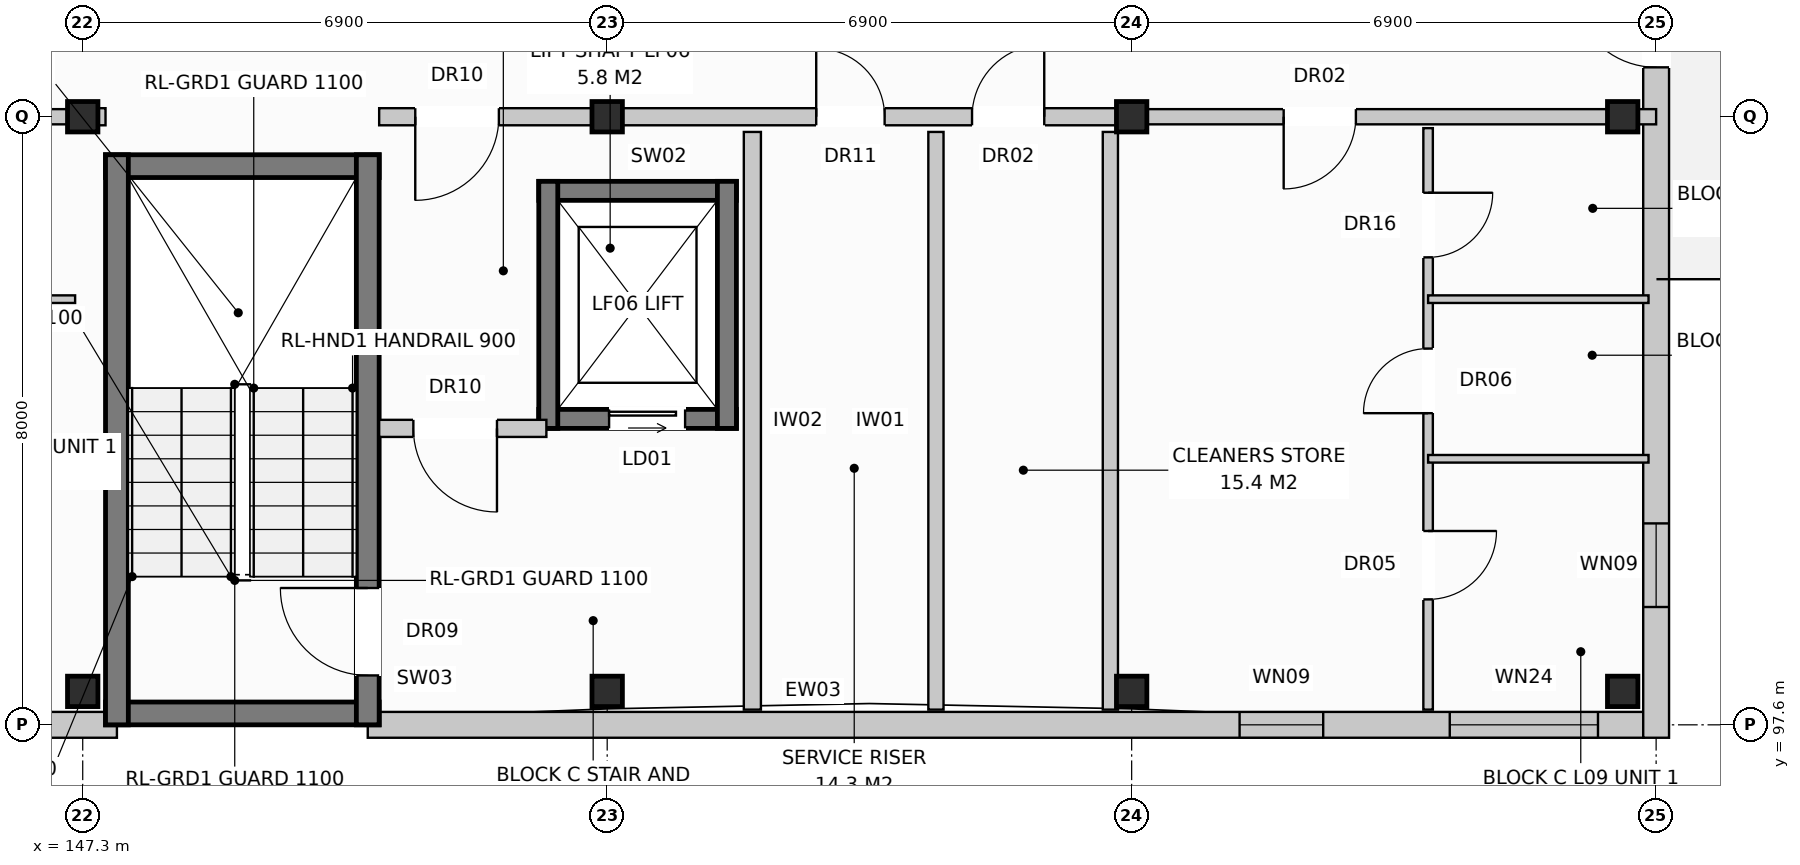
"""IFC4 building model, lengths in metres.
Left out: names, types, materials, properties, quantities, classifications, styles, units other than length and angle.
Written with IfcOpenShell. Run it as: python <this file> out.ifc"""

import sys

from ifc_helpers import new_model, si_unit, direction, frame, frame_2d, origin, origin_with_axes, origin_2d, place, context, subcontext, project, spatial, rectangle, extrude, element, fill, save


model = new_model("IFC4")
c1 = context("Model", 3, precision=1e-05, world=origin(), true_north=direction((0.0, 1.0)))
c2 = subcontext(c1, "Body", "Model", "MODEL_VIEW")
j1 = project(units=[si_unit("LENGTHUNIT", "METRE"), si_unit("PLANEANGLEUNIT", "RADIAN")], contexts=[c1])
p1 = place(None, origin())
s1 = spatial("IfcSite", under=j1, at=p1, CompositionType="ELEMENT")
p2 = place(p1, origin())
s2 = spatial("IfcBuilding", under=s1, at=p2, CompositionType="ELEMENT")
p3 = place(p2, frame((0.0, 0.0, 30.4)))
s3 = spatial("IfcBuildingStorey", under=s2, at=p3, CompositionType="ELEMENT", Elevation=30.4)
for number, where, z_axis, x_axis in (
    (1, (147.3, 98.04, 0.0), (0.0, 0.0, 1.0), (1.0, 0.0, 0.0)),
    (2, (147.3, 105.6, 0.0), (0.0, 0.0, 1.0), (1.0, 0.0, 0.0)),
    (3, (154.2, 98.04, 0.0), (0.0, 0.0, 1.0), (1.0, 0.0, 0.0)),
    (4, (154.2, 105.6, 0.0), (0.0, 0.0, 1.0), (1.0, 0.0, 0.0)),
    (5, (161.1, 98.04, 0.0), (0.0, 0.0, 1.0), (1.0, 0.0, 0.0)),
    (6, (161.1, 105.6, 0.0), (0.0, 0.0, 1.0), (1.0, 0.0, 0.0)),
    (7, (167.56, 98.04, 0.0), (0.0, 0.0, 1.0), (1.0, 0.0, 0.0)),
    (8, (167.56, 105.6, 0.0), (0.0, 0.0, 1.0), (1.0, 0.0, 0.0)),
):
    element("IfcColumn", number, at=place(p3, frame(where, z_axis=z_axis, x_axis=x_axis)), inside=s3, PredefinedType="COLUMN", context=c2, shape_type="SweptSolid", body=[
        extrude(rectangle(XDim=0.4, YDim=0.4, at=origin_2d()), origin(), (0.0, 0.0, 1.0), 3.2),
    ])
p4 = place(p3, frame((130.35, 97.6, 0.0), z_axis=(0.0, 0.0, 1.0), x_axis=(1.0, 0.0, 0.0)))
e9 = element("IfcWall", 9, at=p4, inside=s3, PredefinedType="STANDARD", context=c2, shape_type="SweptSolid", body=[
    extrude(rectangle(XDim=17.4, YDim=0.34, at=frame_2d((8.7, 0.0))), origin(), (0.0, 0.0, 1.0), 2.96),
])
p5 = place(p4, frame((11.879, 0.0, 0.0)))
e10 = element("IfcOpeningElement", 10, at=p5, cuts=e9, PredefinedType="OPENING", context=c2, shape_type="SweptSolid", body=[
    extrude(rectangle(XDim=0.95, YDim=2.1, at=frame_2d((0.475, 1.05))), frame((0.0, 0.182, 0.0), z_axis=(0.0, -1.0, 0.0), x_axis=(1.0, 0.0, 0.0)), (0.0, 0.0, 1.0), 0.364),
])
p6 = place(p4, frame((14.87, 0.0, 0.72)))
e11 = element("IfcOpeningElement", 11, at=p6, cuts=e9, PredefinedType="OPENING", context=c2, shape_type="SweptSolid", body=[
    extrude(rectangle(XDim=1.1, YDim=1.5, at=frame_2d((0.55, 0.75))), frame((0.0, 0.182, 0.0), z_axis=(0.0, -1.0, 0.0), x_axis=(1.0, 0.0, 0.0)), (0.0, 0.0, 1.0), 0.364),
])
p7 = place(p3, frame((151.05, 97.6, 0.0), z_axis=(0.0, 0.0, 1.0), x_axis=(1.0, 0.0, 0.0)))
e12 = element("IfcWall", 12, at=p7, inside=s3, PredefinedType="STANDARD", context=c2, shape_type="SweptSolid", body=[
    extrude(rectangle(XDim=16.79, YDim=0.34, at=frame_2d((8.395, 0.0))), origin(), (0.0, 0.0, 1.0), 2.96),
])
p8 = place(p7, frame((11.47, 0.0, 0.72)))
e13 = element("IfcOpeningElement", 13, at=p8, cuts=e12, PredefinedType="OPENING", context=c2, shape_type="SweptSolid", body=[
    extrude(rectangle(XDim=1.1, YDim=1.5, at=frame_2d((0.55, 0.75))), frame((0.0, 0.182, 0.0), z_axis=(0.0, -1.0, 0.0), x_axis=(1.0, 0.0, 0.0)), (0.0, 0.0, 1.0), 0.364),
])
p9 = place(p7, frame((14.235, 0.0, 0.8)))
e14 = element("IfcOpeningElement", 14, at=p9, cuts=e12, PredefinedType="OPENING", context=c2, shape_type="SweptSolid", body=[
    extrude(rectangle(XDim=1.95, YDim=1.65, at=frame_2d((0.975, 0.825))), frame((0.0, 0.182, 0.0), z_axis=(0.0, -1.0, 0.0), x_axis=(1.0, 0.0, 0.0)), (0.0, 0.0, 1.0), 0.364),
])
p10 = place(p3, frame((168.0, 97.43, 0.0), z_axis=(0.0, 0.0, 1.0), x_axis=(0.0, 1.0, 0.0)))
e15 = element("IfcWall", 15, at=p10, inside=s3, PredefinedType="STANDARD", context=c2, shape_type="SweptSolid", body=[
    extrude(rectangle(XDim=18.74, YDim=0.34, at=frame_2d((9.37, 0.0))), origin(), (0.0, 0.0, 1.0), 2.96),
])
p11 = place(p10, frame((8.82, 0.0, 0.0)))
e16 = element("IfcOpeningElement", 16, at=p11, cuts=e15, PredefinedType="OPENING", context=c2, shape_type="SweptSolid", body=[
    extrude(rectangle(XDim=1.1, YDim=2.1, at=frame_2d((0.55, 1.05))), frame((0.0, 0.182, 0.0), z_axis=(0.0, -1.0, 0.0), x_axis=(1.0, 0.0, 0.0)), (0.0, 0.0, 1.0), 0.364),
])
p12 = place(p10, frame((1.72, 0.0, 0.72)))
e17 = element("IfcOpeningElement", 17, at=p12, cuts=e15, PredefinedType="OPENING", context=c2, shape_type="SweptSolid", body=[
    extrude(rectangle(XDim=1.1, YDim=1.5, at=frame_2d((0.55, 0.75))), frame((0.0, 0.182, 0.0), z_axis=(0.0, -1.0, 0.0), x_axis=(1.0, 0.0, 0.0)), (0.0, 0.0, 1.0), 0.364),
])
p13 = place(p10, frame((15.92, 0.0, 0.72)))
e18 = element("IfcOpeningElement", 18, at=p13, cuts=e15, PredefinedType="OPENING", context=c2, shape_type="SweptSolid", body=[
    extrude(rectangle(XDim=1.1, YDim=1.5, at=frame_2d((0.55, 0.75))), frame((0.0, 0.182, 0.0), z_axis=(0.0, -1.0, 0.0), x_axis=(1.0, 0.0, 0.0)), (0.0, 0.0, 1.0), 0.364),
])
for number, where, z_axis, x_axis in (
    (19, (147.6, 97.75, 0.0), (0.0, 0.0, 1.0), (1.0, 0.0, 0.0)),
    (20, (147.6, 104.95, 0.0), (0.0, 0.0, 1.0), (1.0, 0.0, 0.0)),
):
    element("IfcWall", number, at=place(p3, frame(where, z_axis=z_axis, x_axis=x_axis)), inside=s3, PredefinedType="SHEAR", context=c2, shape_type="SweptSolid", body=[
        extrude(rectangle(XDim=3.6, YDim=0.3, at=frame_2d((1.8, 0.0))), origin(), (0.0, 0.0, 1.0), 2.96),
    ])
p14 = place(p3, frame((147.75, 97.6, 0.0), z_axis=(0.0, 0.0, 1.0), x_axis=(0.0, 1.0, 0.0)))
e21 = element("IfcWall", 21, at=p14, inside=s3, PredefinedType="SHEAR", context=c2, shape_type="SweptSolid", body=[
    extrude(rectangle(XDim=7.5, YDim=0.3, at=frame_2d((3.75, 0.0))), origin(), (0.0, 0.0, 1.0), 2.96),
])
p15 = place(p3, frame((151.05, 97.6, 0.0), z_axis=(0.0, 0.0, 1.0), x_axis=(0.0, 1.0, 0.0)))
e22 = element("IfcWall", 22, at=p15, inside=s3, PredefinedType="SHEAR", context=c2, shape_type="SweptSolid", body=[
    extrude(rectangle(XDim=7.5, YDim=0.3, at=frame_2d((3.75, 0.0))), origin(), (0.0, 0.0, 1.0), 2.96),
])
p16 = place(p15, frame((0.65, 0.0, 0.0)))
e23 = element("IfcOpeningElement", 23, at=p16, cuts=e22, PredefinedType="OPENING", context=c2, shape_type="SweptSolid", body=[
    extrude(rectangle(XDim=1.15, YDim=2.15, at=frame_2d((0.575, 1.075))), frame((0.0, 0.162, 0.0), z_axis=(0.0, -1.0, 0.0), x_axis=(1.0, 0.0, 0.0)), (0.0, 0.0, 1.0), 0.324),
])
p17 = place(p3, frame((153.3, 101.625, 0.0), z_axis=(0.0, 0.0, 1.0), x_axis=(1.0, 0.0, 0.0)))
e24 = element("IfcWall", 24, at=p17, inside=s3, PredefinedType="SHEAR", context=c2, shape_type="SweptSolid", body=[
    extrude(rectangle(XDim=2.6, YDim=0.25, at=frame_2d((1.3, 0.0))), origin(), (0.0, 0.0, 1.0), 2.96),
])
p18 = place(p17, frame((0.925, 0.0, 0.0)))
e25 = element("IfcOpeningElement", 25, at=p18, cuts=e24, PredefinedType="OPENING", context=c2, shape_type="SweptSolid", body=[
    extrude(rectangle(XDim=1.0, YDim=2.1, at=frame_2d((0.5, 1.05))), frame((0.0, 0.137, 0.0), z_axis=(0.0, -1.0, 0.0), x_axis=(1.0, 0.0, 0.0)), (0.0, 0.0, 1.0), 0.274),
])
p19 = place(p3, frame((153.3, 104.625, 0.0), z_axis=(0.0, 0.0, 1.0), x_axis=(1.0, 0.0, 0.0)))
e26 = element("IfcWall", 26, at=p19, inside=s3, PredefinedType="SHEAR", context=c2, shape_type="SweptSolid", body=[
    extrude(rectangle(XDim=2.6, YDim=0.25, at=frame_2d((1.3, 0.0))), origin(), (0.0, 0.0, 1.0), 2.96),
])
for number, where, z_axis, x_axis in (
    (27, (153.425, 101.5, 0.0), (0.0, 0.0, 1.0), (0.0, 1.0, 0.0)),
    (28, (155.775, 101.5, 0.0), (0.0, 0.0, 1.0), (0.0, 1.0, 0.0)),
):
    element("IfcWall", number, at=place(p3, frame(where, z_axis=z_axis, x_axis=x_axis)), inside=s3, PredefinedType="SHEAR", context=c2, shape_type="SweptSolid", body=[
        extrude(rectangle(XDim=3.25, YDim=0.25, at=frame_2d((1.625, 0.0))), origin(), (0.0, 0.0, 1.0), 2.96),
    ])
p20 = place(p3, frame((156.11, 97.8, 0.0), z_axis=(0.0, 0.0, 1.0), x_axis=(0.0, 1.0, 0.0)))
e29 = element("IfcWall", 29, at=p20, inside=s3, PredefinedType="PARTITIONING", context=c2, shape_type="SweptSolid", body=[
    extrude(rectangle(XDim=7.6, YDim=0.225, at=frame_2d((3.8, 0.0))), origin(), (0.0, 0.0, 1.0), 2.59),
])
p21 = place(p3, frame((151.2, 101.5, 0.0), z_axis=(0.0, 0.0, 1.0), x_axis=(1.0, 0.0, 0.0)))
e30 = element("IfcWall", 30, at=p21, inside=s3, PredefinedType="PARTITIONING", context=c2, shape_type="SweptSolid", body=[
    extrude(rectangle(XDim=2.2, YDim=0.225, at=frame_2d((1.1, 0.0))), origin(), (0.0, 0.0, 1.0), 2.96),
])
p22 = place(p21, frame((0.45, 0.0, 0.0)))
e31 = element("IfcOpeningElement", 31, at=p22, cuts=e30, PredefinedType="OPENING", context=c2, shape_type="SweptSolid", body=[
    extrude(rectangle(XDim=1.1, YDim=2.15, at=frame_2d((0.55, 1.075))), frame((0.0, 0.125, 0.0), z_axis=(0.0, -1.0, 0.0), x_axis=(1.0, 0.0, 0.0)), (0.0, 0.0, 1.0), 0.249),
])
p23 = place(p3, frame((147.3, 105.6, 0.0), z_axis=(0.0, 0.0, 1.0), x_axis=(1.0, 0.0, 0.0)))
e32 = element("IfcWall", 32, at=p23, inside=s3, PredefinedType="PARTITIONING", context=c2, shape_type="SweptSolid", body=[
    extrude(rectangle(XDim=0.3, YDim=0.225, at=frame_2d((0.15, 0.0))), origin(), (0.0, 0.0, 1.0), 2.96),
])
p24 = place(p3, frame((158.525, 97.8, 0.0), z_axis=(0.0, 0.0, 1.0), x_axis=(0.0, 1.0, 0.0)))
e33 = element("IfcWall", 33, at=p24, inside=s3, PredefinedType="PARTITIONING", context=c2, shape_type="SweptSolid", body=[
    extrude(rectangle(XDim=7.6, YDim=0.2, at=frame_2d((3.8, 0.0))), origin(), (0.0, 0.0, 1.0), 2.59),
])
p25 = place(p3, frame((160.82, 97.8, 0.0), z_axis=(0.0, 0.0, 1.0), x_axis=(0.0, 1.0, 0.0)))
e34 = element("IfcWall", 34, at=p25, inside=s3, PredefinedType="PARTITIONING", context=c2, shape_type="SweptSolid", body=[
    extrude(rectangle(XDim=7.6, YDim=0.2, at=frame_2d((3.8, 0.0))), origin(), (0.0, 0.0, 1.0), 2.4),
])
p26 = place(p3, frame((151.2, 105.6, 0.0), z_axis=(0.0, 0.0, 1.0), x_axis=(1.0, 0.0, 0.0)))
e35 = element("IfcWall", 35, at=p26, inside=s3, PredefinedType="PARTITIONING", context=c2, shape_type="SweptSolid", body=[
    extrude(rectangle(XDim=9.9, YDim=0.225, at=frame_2d((4.95, 0.0))), origin(), (0.0, 0.0, 1.0), 2.4),
])
p27 = place(p26, frame((0.475, 0.0, 0.0)))
e36 = element("IfcOpeningElement", 36, at=p27, cuts=e35, PredefinedType="OPENING", context=c2, shape_type="SweptSolid", body=[
    extrude(rectangle(XDim=1.1, YDim=2.15, at=frame_2d((0.55, 1.075))), frame((0.0, 0.125, 0.0), z_axis=(0.0, -1.0, 0.0), x_axis=(1.0, 0.0, 0.0)), (0.0, 0.0, 1.0), 0.249),
])
p28 = place(p26, frame((5.75, 0.0, 0.0)))
e37 = element("IfcOpeningElement", 37, at=p28, cuts=e35, PredefinedType="OPENING", context=c2, shape_type="SweptSolid", body=[
    extrude(rectangle(XDim=0.9, YDim=2.1, at=frame_2d((0.45, 1.05))), frame((0.0, 0.125, 0.0), z_axis=(0.0, -1.0, 0.0), x_axis=(1.0, 0.0, 0.0)), (0.0, 0.0, 1.0), 0.249),
])
p29 = place(p26, frame((7.8, 0.0, 0.0)))
e38 = element("IfcOpeningElement", 38, at=p29, cuts=e35, PredefinedType="OPENING", context=c2, shape_type="SweptSolid", body=[
    extrude(rectangle(XDim=0.95, YDim=2.15, at=frame_2d((0.475, 1.075))), frame((0.0, 0.125, 0.0), z_axis=(0.0, -1.0, 0.0), x_axis=(1.0, 0.0, 0.0)), (0.0, 0.0, 1.0), 0.249),
])
p30 = place(p3, frame((140.4, 105.6, 0.0), z_axis=(0.0, 0.0, 1.0), x_axis=(1.0, 0.0, 0.0)))
e39 = element("IfcWall", 39, at=p30, inside=s3, PredefinedType="PARTITIONING", context=c2, shape_type="SweptSolid", body=[
    extrude(rectangle(XDim=6.9, YDim=0.2, at=frame_2d((3.45, 0.0))), origin(), (0.0, 0.0, 1.0), 2.4),
])
p31 = place(p30, frame((2.0, 0.0, 0.0)))
e40 = element("IfcOpeningElement", 40, at=p31, cuts=e39, PredefinedType="OPENING", context=c2, shape_type="SweptSolid", body=[
    extrude(rectangle(XDim=0.95, YDim=2.15, at=frame_2d((0.475, 1.075))), frame((0.0, 0.112, 0.0), z_axis=(0.0, -1.0, 0.0), x_axis=(1.0, 0.0, 0.0)), (0.0, 0.0, 1.0), 0.224),
])
for number, where, z_axis, x_axis in (
    (41, (144.3, 103.2, 0.0), (0.0, 0.0, 1.0), (1.0, 0.0, 0.0)),
    (42, (144.3, 101.1, 0.0), (0.0, 0.0, 1.0), (1.0, 0.0, 0.0)),
):
    element("IfcWall", number, at=place(p3, frame(where, z_axis=z_axis, x_axis=x_axis)), inside=s3, PredefinedType="PARTITIONING", context=c2, shape_type="SweptSolid", body=[
        extrude(rectangle(XDim=2.9, YDim=0.1, at=frame_2d((1.45, 0.0))), origin(), (0.0, 0.0, 1.0), 2.96),
    ])
p32 = place(p3, frame((161.1, 105.6, 0.0), z_axis=(0.0, 0.0, 1.0), x_axis=(1.0, 0.0, 0.0)))
e43 = element("IfcWall", 43, at=p32, inside=s3, PredefinedType="PARTITIONING", context=c2, shape_type="SweptSolid", body=[
    extrude(rectangle(XDim=6.9, YDim=0.2, at=frame_2d((3.45, 0.0))), origin(), (0.0, 0.0, 1.0), 2.4),
])
p33 = place(p32, frame((2.0, 0.0, 0.0)))
e44 = element("IfcOpeningElement", 44, at=p33, cuts=e43, PredefinedType="OPENING", context=c2, shape_type="SweptSolid", body=[
    extrude(rectangle(XDim=0.95, YDim=2.15, at=frame_2d((0.475, 1.075))), frame((0.0, 0.112, 0.0), z_axis=(0.0, -1.0, 0.0), x_axis=(1.0, 0.0, 0.0)), (0.0, 0.0, 1.0), 0.224),
])
p34 = place(p3, frame((165.0, 105.45, 0.0), z_axis=(0.0, 0.0, 1.0), x_axis=(0.0, -1.0, 0.0)))
e45 = element("IfcWall", 45, at=p34, inside=s3, PredefinedType="PARTITIONING", context=c2, shape_type="SweptSolid", body=[
    extrude(rectangle(XDim=7.65, YDim=0.125, at=frame_2d((3.825, 0.0))), origin(), (0.0, 0.0, 1.0), 2.96),
])
p35 = place(p34, frame((0.85, 0.0, 0.0)))
e46 = element("IfcOpeningElement", 46, at=p35, cuts=e45, PredefinedType="OPENING", context=c2, shape_type="SweptSolid", body=[
    extrude(rectangle(XDim=0.85, YDim=2.1, at=frame_2d((0.425, 1.05))), frame((0.0, 0.074, 0.0), z_axis=(0.0, -1.0, 0.0), x_axis=(1.0, 0.0, 0.0)), (0.0, 0.0, 1.0), 0.149),
])
p36 = place(p34, frame((2.9, 0.0, 0.0)))
e47 = element("IfcOpeningElement", 47, at=p36, cuts=e45, PredefinedType="OPENING", context=c2, shape_type="SweptSolid", body=[
    extrude(rectangle(XDim=0.85, YDim=2.05, at=frame_2d((0.425, 1.025))), frame((0.0, 0.074, 0.0), z_axis=(0.0, -1.0, 0.0), x_axis=(1.0, 0.0, 0.0)), (0.0, 0.0, 1.0), 0.149),
])
p37 = place(p34, frame((5.3, 0.0, 0.0)))
e48 = element("IfcOpeningElement", 48, at=p37, cuts=e45, PredefinedType="OPENING", context=c2, shape_type="SweptSolid", body=[
    extrude(rectangle(XDim=0.9, YDim=2.1, at=frame_2d((0.45, 1.05))), frame((0.0, 0.074, 0.0), z_axis=(0.0, -1.0, 0.0), x_axis=(1.0, 0.0, 0.0)), (0.0, 0.0, 1.0), 0.149),
])
for number, where, z_axis, x_axis in (
    (49, (165.0, 103.2, 0.0), (0.0, 0.0, 1.0), (1.0, 0.0, 0.0)),
    (50, (165.0, 101.1, 0.0), (0.0, 0.0, 1.0), (1.0, 0.0, 0.0)),
):
    element("IfcWall", number, at=place(p3, frame(where, z_axis=z_axis, x_axis=x_axis)), inside=s3, PredefinedType="PARTITIONING", context=c2, shape_type="SweptSolid", body=[
        extrude(rectangle(XDim=2.9, YDim=0.1, at=frame_2d((1.45, 0.0))), origin(), (0.0, 0.0, 1.0), 2.96),
    ])
p38 = place(p8, origin_with_axes())
e51 = element("IfcWindow", 51, at=p38, inside=s3, PartitioningType="SINGLE_PANEL", PredefinedType="WINDOW", context=c2, shape_type="SweptSolid", body=[
    extrude(rectangle(XDim=1.1, YDim=1.5, at=frame_2d((0.55, 0.75))), frame((0.0, 0.03, 0.0), z_axis=(0.0, -1.0, 0.0), x_axis=(1.0, 0.0, 0.0)), (0.0, 0.0, 1.0), 0.06),
])
fill(e13, e51)
p39 = place(p9, origin_with_axes())
e52 = element("IfcWindow", 52, at=p39, inside=s3, PartitioningType="SINGLE_PANEL", PredefinedType="WINDOW", context=c2, shape_type="SweptSolid", body=[
    extrude(rectangle(XDim=1.95, YDim=1.65, at=frame_2d((0.975, 0.825))), frame((0.0, 0.03, 0.0), z_axis=(0.0, -1.0, 0.0), x_axis=(1.0, 0.0, 0.0)), (0.0, 0.0, 1.0), 0.06),
])
fill(e14, e52)
p40 = place(p11, origin_with_axes())
e53 = element("IfcDoor", 53, at=p40, inside=s3, OperationType="SINGLE_SWING_RIGHT", PredefinedType="DOOR", context=c2, shape_type="SweptSolid", body=[
    extrude(rectangle(XDim=1.1, YDim=2.1, at=frame_2d((0.55, 1.05))), frame((0.0, 0.025, 0.0), z_axis=(0.0, -1.0, 0.0), x_axis=(1.0, 0.0, 0.0)), (0.0, 0.0, 1.0), 0.05),
])
fill(e16, e53)
p41 = place(p12, origin_with_axes())
e54 = element("IfcWindow", 54, at=p41, inside=s3, PartitioningType="SINGLE_PANEL", PredefinedType="WINDOW", context=c2, shape_type="SweptSolid", body=[
    extrude(rectangle(XDim=1.1, YDim=1.5, at=frame_2d((0.55, 0.75))), frame((0.0, 0.03, 0.0), z_axis=(0.0, -1.0, 0.0), x_axis=(1.0, 0.0, 0.0)), (0.0, 0.0, 1.0), 0.06),
])
fill(e17, e54)
p42 = place(p16, origin_with_axes())
e55 = element("IfcDoor", 55, at=p42, inside=s3, OperationType="SINGLE_SWING_RIGHT", PredefinedType="DOOR", context=c2, shape_type="SweptSolid", body=[
    extrude(rectangle(XDim=1.15, YDim=2.15, at=frame_2d((0.575, 1.075))), frame((0.0, 0.025, 0.0), z_axis=(0.0, -1.0, 0.0), x_axis=(1.0, 0.0, 0.0)), (0.0, 0.0, 1.0), 0.05),
])
fill(e23, e55)
p43 = place(p18, origin_with_axes())
e56 = element("IfcDoor", 56, at=p43, inside=s3, OperationType="SLIDING_TO_LEFT", PredefinedType="DOOR", context=c2, shape_type="SweptSolid", body=[
    extrude(rectangle(XDim=1.0, YDim=2.1, at=frame_2d((0.5, 1.05))), frame((0.0, 0.025, 0.0), z_axis=(0.0, -1.0, 0.0), x_axis=(1.0, 0.0, 0.0)), (0.0, 0.0, 1.0), 0.05),
])
fill(e25, e56)
p44 = place(p22, frame((1.1, 0.0, 0.0), z_axis=(0.0, 0.0, 1.0), x_axis=(-1.0, 0.0, 0.0)))
e57 = element("IfcDoor", 57, at=p44, inside=s3, OperationType="SINGLE_SWING_RIGHT", PredefinedType="DOOR", context=c2, shape_type="SweptSolid", body=[
    extrude(rectangle(XDim=1.1, YDim=2.15, at=frame_2d((0.55, 1.075))), frame((0.0, 0.025, 0.0), z_axis=(0.0, -1.0, 0.0), x_axis=(1.0, 0.0, 0.0)), (0.0, 0.0, 1.0), 0.05),
])
fill(e31, e57)
p45 = place(p27, frame((1.1, 0.0, 0.0), z_axis=(0.0, 0.0, 1.0), x_axis=(-1.0, 0.0, 0.0)))
e58 = element("IfcDoor", 58, at=p45, inside=s3, OperationType="SINGLE_SWING_LEFT", PredefinedType="DOOR", context=c2, shape_type="SweptSolid", body=[
    extrude(rectangle(XDim=1.1, YDim=2.15, at=frame_2d((0.55, 1.075))), frame((0.0, 0.025, 0.0), z_axis=(0.0, -1.0, 0.0), x_axis=(1.0, 0.0, 0.0)), (0.0, 0.0, 1.0), 0.05),
])
fill(e36, e58)
p46 = place(p28, origin_with_axes())
e59 = element("IfcDoor", 59, at=p46, inside=s3, OperationType="SINGLE_SWING_LEFT", PredefinedType="DOOR", context=c2, shape_type="SweptSolid", body=[
    extrude(rectangle(XDim=0.9, YDim=2.1, at=frame_2d((0.45, 1.05))), frame((0.0, 0.025, 0.0), z_axis=(0.0, -1.0, 0.0), x_axis=(1.0, 0.0, 0.0)), (0.0, 0.0, 1.0), 0.05),
])
fill(e37, e59)
p47 = place(p29, origin_with_axes())
e60 = element("IfcDoor", 60, at=p47, inside=s3, OperationType="SINGLE_SWING_RIGHT", PredefinedType="DOOR", context=c2, shape_type="SweptSolid", body=[
    extrude(rectangle(XDim=0.95, YDim=2.15, at=frame_2d((0.475, 1.075))), frame((0.0, 0.025, 0.0), z_axis=(0.0, -1.0, 0.0), x_axis=(1.0, 0.0, 0.0)), (0.0, 0.0, 1.0), 0.05),
])
fill(e38, e60)
p48 = place(p33, frame((0.95, 0.0, 0.0), z_axis=(0.0, 0.0, 1.0), x_axis=(-1.0, 0.0, 0.0)))
e61 = element("IfcDoor", 61, at=p48, inside=s3, OperationType="SINGLE_SWING_LEFT", PredefinedType="DOOR", context=c2, shape_type="SweptSolid", body=[
    extrude(rectangle(XDim=0.95, YDim=2.15, at=frame_2d((0.475, 1.075))), frame((0.0, 0.025, 0.0), z_axis=(0.0, -1.0, 0.0), x_axis=(1.0, 0.0, 0.0)), (0.0, 0.0, 1.0), 0.05),
])
fill(e44, e61)
p49 = place(p35, origin_with_axes())
e62 = element("IfcDoor", 62, at=p49, inside=s3, OperationType="SINGLE_SWING_LEFT", PredefinedType="DOOR", context=c2, shape_type="SweptSolid", body=[
    extrude(rectangle(XDim=0.85, YDim=2.1, at=frame_2d((0.425, 1.05))), frame((0.0, 0.025, 0.0), z_axis=(0.0, -1.0, 0.0), x_axis=(1.0, 0.0, 0.0)), (0.0, 0.0, 1.0), 0.05),
])
fill(e46, e62)
p50 = place(p36, frame((0.85, 0.0, 0.0), z_axis=(0.0, 0.0, 1.0), x_axis=(-1.0, 0.0, 0.0)))
e63 = element("IfcDoor", 63, at=p50, inside=s3, OperationType="SINGLE_SWING_RIGHT", PredefinedType="DOOR", context=c2, shape_type="SweptSolid", body=[
    extrude(rectangle(XDim=0.85, YDim=2.05, at=frame_2d((0.425, 1.025))), frame((0.0, 0.025, 0.0), z_axis=(0.0, -1.0, 0.0), x_axis=(1.0, 0.0, 0.0)), (0.0, 0.0, 1.0), 0.05),
])
fill(e47, e63)
p51 = place(p37, origin_with_axes())
e64 = element("IfcDoor", 64, at=p51, inside=s3, OperationType="SINGLE_SWING_LEFT", PredefinedType="DOOR", context=c2, shape_type="SweptSolid", body=[
    extrude(rectangle(XDim=0.9, YDim=2.1, at=frame_2d((0.45, 1.05))), frame((0.0, 0.025, 0.0), z_axis=(0.0, -1.0, 0.0), x_axis=(1.0, 0.0, 0.0)), (0.0, 0.0, 1.0), 0.05),
])
fill(e48, e64)
save(model, sys.argv[1])
